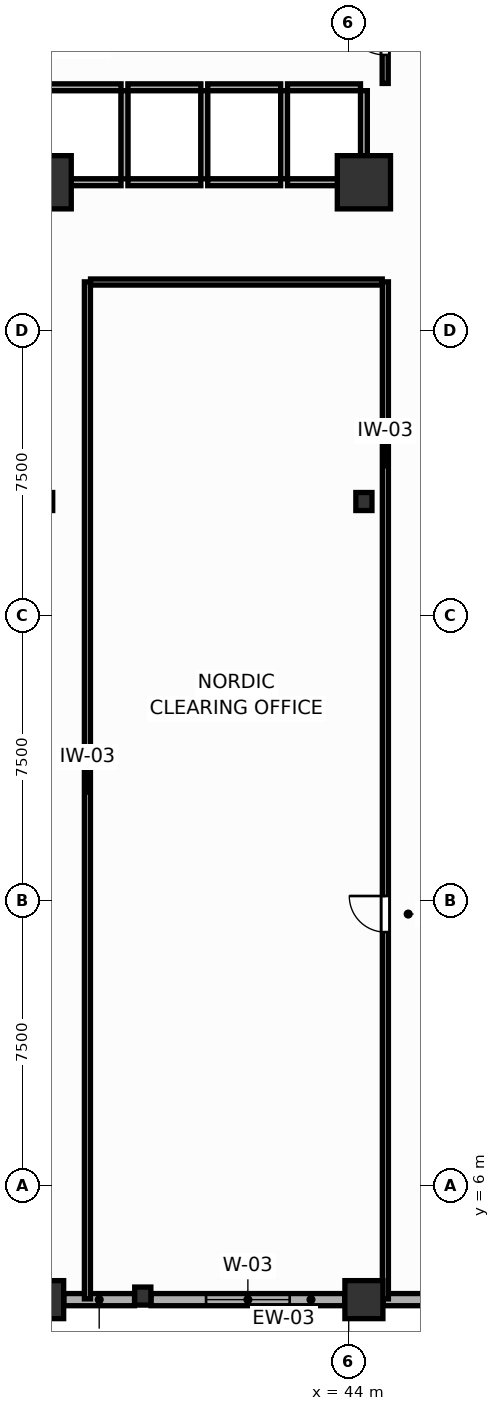
"""IFC4 building model, lengths in metres.
Left out: names, types, materials, properties, quantities, classifications, styles, units other than length and angle.
Written with IfcOpenShell. Run it as: python <this file> out.ifc"""

import sys

from ifc_helpers import new_model, si_unit, direction, frame, frame_2d, origin, origin_2d, place, context, subcontext, project, spatial, rectangle, i_section, extrude, source, transform, mapped, element, fill, save


model = new_model("IFC4")
c1 = context("Model", 3, precision=1e-05, world=origin(), true_north=direction((0.0, 1.0)))
c2 = subcontext(c1, "Body", "Model", "MODEL_VIEW")
j1 = project(units=[si_unit("LENGTHUNIT", "METRE"), si_unit("PLANEANGLEUNIT", "RADIAN")], contexts=[c1])
p1 = place(None, origin())
s1 = spatial("IfcSite", under=j1, at=p1, CompositionType="ELEMENT")
p2 = place(p1, origin())
s2 = spatial("IfcBuilding", under=s1, at=p2, CompositionType="ELEMENT")
p3 = place(p2, frame((0.0, 0.0, 14.4)))
s3 = spatial("IfcBuildingStorey", under=s2, at=p3, CompositionType="ELEMENT", Elevation=14.4)
m1 = source(origin(), c2, "Body", "SweptSolid", [
    extrude(rectangle(XDim=1.4, YDim=1.4, at=origin_2d()), origin(), (0.0, 0.0, 1.0), 4.8),
])
for number, where, z_axis, x_axis in (
    (1, (44.4, 32.4, 0.0), (0.0, 0.0, 1.0), (1.0, 0.0, 0.0)),
    (2, (36.0, 32.4, 0.0), (0.0, 0.0, 1.0), (1.0, 0.0, 0.0)),
):
    element("IfcColumn", number, at=place(p3, frame(where, z_axis=z_axis, x_axis=x_axis)), inside=s3, PredefinedType="COLUMN", context=c2, shape_type="MappedRepresentation", body=[
        mapped(m1, transform((0.0, 0.0, 0.0), scale=1.0)),
    ])
m2 = source(origin(), c2, "Body", "SweptSolid", [
    extrude(i_section(OverallWidth=0.424, OverallDepth=0.474, WebThickness=0.045, FlangeThickness=0.072, FilletRadius=0.015, at=origin_2d()), origin(), (0.0, 0.0, 1.0), 4.8),
])
for number, where, z_axis, x_axis in (
    (3, (44.4, 24.0, 0.0), (0.0, 0.0, 1.0), (1.0, 0.0, 0.0)),
    (4, (36.0, 24.0, 0.0), (0.0, 0.0, 1.0), (1.0, 0.0, 0.0)),
):
    element("IfcColumn", number, at=place(p3, frame(where, z_axis=z_axis, x_axis=x_axis)), inside=s3, PredefinedType="COLUMN", context=c2, shape_type="MappedRepresentation", body=[
        mapped(m2, transform((0.0, 0.0, 0.0), scale=1.0)),
    ])
m3 = source(origin(), c2, "Body", "SweptSolid", [
    extrude(rectangle(XDim=1.0, YDim=1.0, at=origin_2d()), origin(), (0.0, 0.0, 1.0), 4.8),
])
for number, where, z_axis, x_axis in (
    (5, (36.0, 3.0, 0.0), (0.0, 0.0, 1.0), (1.0, 0.0, 0.0)),
    (6, (44.4, 3.0, 0.0), (0.0, 0.0, 1.0), (1.0, 0.0, 0.0)),
):
    element("IfcColumn", number, at=place(p3, frame(where, z_axis=z_axis, x_axis=x_axis)), inside=s3, PredefinedType="COLUMN", context=c2, shape_type="MappedRepresentation", body=[
        mapped(m3, transform((0.0, 0.0, 0.0), scale=1.0)),
    ])
p4 = place(p3, frame((38.582, 3.094, 0.0), z_axis=(0.0, 0.0, 1.0), x_axis=(1.0, 0.0, 0.0)))
e7 = element("IfcColumn", 7, at=p4, inside=s3, PredefinedType="COLUMN", context=c2, shape_type="MappedRepresentation", body=[
    mapped(m2, transform((0.0, 0.0, 0.0), scale=1.0)),
])
p5 = place(p3, frame((36.505, 3.0, 0.0), z_axis=(0.0, 0.0, 1.0), x_axis=(1.0, 0.0, 0.0)))
e8 = element("IfcWall", 8, at=p5, inside=s3, PredefinedType="SOLIDWALL", context=c2, shape_type="SweptSolid", body=[
    extrude(rectangle(XDim=1.86, YDim=0.32, at=frame_2d((0.93, 0.0))), origin(), (0.0, 0.0, 1.0), 3.82),
])
p6 = place(p3, frame((38.799, 3.0, 0.0), z_axis=(0.0, 0.0, 1.0), x_axis=(1.0, 0.0, 0.0)))
e9 = element("IfcWall", 9, at=p6, inside=s3, PredefinedType="SOLIDWALL", context=c2, shape_type="SweptSolid", body=[
    extrude(rectangle(XDim=5.096, YDim=0.32, at=frame_2d((2.548, 0.0))), origin(), (0.0, 0.0, 1.0), 3.82),
])
p7 = place(p6, frame((1.448, 0.0, 0.75)))
e10 = element("IfcOpeningElement", 10, at=p7, cuts=e9, PredefinedType="OPENING", context=c2, shape_type="SweptSolid", body=[
    extrude(rectangle(XDim=2.2, YDim=2.0, at=frame_2d((1.1, 1.0))), frame((0.0, 0.17, 0.0), z_axis=(0.0, -1.0, 0.0), x_axis=(1.0, 0.0, 0.0)), (0.0, 0.0, 1.0), 0.34),
])
p8 = place(p3, frame((44.905, 3.0, 0.0), z_axis=(0.0, 0.0, 1.0), x_axis=(1.0, 0.0, 0.0)))
e11 = element("IfcWall", 11, at=p8, inside=s3, PredefinedType="SOLIDWALL", context=c2, shape_type="SweptSolid", body=[
    extrude(rectangle(XDim=12.59, YDim=0.32, at=frame_2d((6.295, 0.0))), origin(), (0.0, 0.0, 1.0), 3.82),
])
p9 = place(p8, frame((5.195, 0.0, 0.75)))
e12 = element("IfcOpeningElement", 12, at=p9, cuts=e11, PredefinedType="OPENING", context=c2, shape_type="SweptSolid", body=[
    extrude(rectangle(XDim=2.2, YDim=2.0, at=frame_2d((1.1, 1.0))), frame((0.0, 0.17, 0.0), z_axis=(0.0, -1.0, 0.0), x_axis=(1.0, 0.0, 0.0)), (0.0, 0.0, 1.0), 0.34),
])
p10 = place(p3, frame((36.09, 34.9, 0.0), z_axis=(0.0, 0.0, 1.0), x_axis=(1.0, 0.0, 0.0)))
e13 = element("IfcWall", 13, at=p10, inside=s3, PredefinedType="PARTITIONING", context=c2, shape_type="SweptSolid", body=[
    extrude(rectangle(XDim=1.92, YDim=0.18, at=frame_2d((0.96, 0.0))), origin(), (0.0, 0.0, 1.0), 4.52),
])
p11 = place(p3, frame((36.09, 32.4, 0.0), z_axis=(0.0, 0.0, 1.0), x_axis=(1.0, 0.0, 0.0)))
e14 = element("IfcWall", 14, at=p11, inside=s3, PredefinedType="PARTITIONING", context=c2, shape_type="SweptSolid", body=[
    extrude(rectangle(XDim=1.92, YDim=0.18, at=frame_2d((0.96, 0.0))), origin(), (0.0, 0.0, 1.0), 3.82),
])
p12 = place(p3, frame((38.19, 34.9, 0.0), z_axis=(0.0, 0.0, 1.0), x_axis=(1.0, 0.0, 0.0)))
e15 = element("IfcWall", 15, at=p12, inside=s3, PredefinedType="PARTITIONING", context=c2, shape_type="SweptSolid", body=[
    extrude(rectangle(XDim=1.92, YDim=0.18, at=frame_2d((0.96, 0.0))), origin(), (0.0, 0.0, 1.0), 4.52),
])
p13 = place(p3, frame((38.19, 32.4, 0.0), z_axis=(0.0, 0.0, 1.0), x_axis=(1.0, 0.0, 0.0)))
e16 = element("IfcWall", 16, at=p13, inside=s3, PredefinedType="PARTITIONING", context=c2, shape_type="SweptSolid", body=[
    extrude(rectangle(XDim=1.92, YDim=0.18, at=frame_2d((0.96, 0.0))), origin(), (0.0, 0.0, 1.0), 3.82),
])
p14 = place(p3, frame((38.1, 32.49, 0.0), z_axis=(0.0, 0.0, 1.0), x_axis=(0.0, 1.0, 0.0)))
e17 = element("IfcWall", 17, at=p14, inside=s3, PredefinedType="PARTITIONING", context=c2, shape_type="SweptSolid", body=[
    extrude(rectangle(XDim=2.32, YDim=0.18, at=frame_2d((1.16, 0.0))), origin(), (0.0, 0.0, 1.0), 4.52),
])
p15 = place(p3, frame((40.29, 34.9, 0.0), z_axis=(0.0, 0.0, 1.0), x_axis=(1.0, 0.0, 0.0)))
e18 = element("IfcWall", 18, at=p15, inside=s3, PredefinedType="PARTITIONING", context=c2, shape_type="SweptSolid", body=[
    extrude(rectangle(XDim=1.92, YDim=0.18, at=frame_2d((0.96, 0.0))), origin(), (0.0, 0.0, 1.0), 4.52),
])
p16 = place(p3, frame((40.29, 32.4, 0.0), z_axis=(0.0, 0.0, 1.0), x_axis=(1.0, 0.0, 0.0)))
e19 = element("IfcWall", 19, at=p16, inside=s3, PredefinedType="PARTITIONING", context=c2, shape_type="SweptSolid", body=[
    extrude(rectangle(XDim=1.92, YDim=0.18, at=frame_2d((0.96, 0.0))), origin(), (0.0, 0.0, 1.0), 3.82),
])
p17 = place(p3, frame((40.2, 32.49, 0.0), z_axis=(0.0, 0.0, 1.0), x_axis=(0.0, 1.0, 0.0)))
e20 = element("IfcWall", 20, at=p17, inside=s3, PredefinedType="PARTITIONING", context=c2, shape_type="SweptSolid", body=[
    extrude(rectangle(XDim=2.32, YDim=0.18, at=frame_2d((1.16, 0.0))), origin(), (0.0, 0.0, 1.0), 4.52),
])
p18 = place(p3, frame((42.39, 34.9, 0.0), z_axis=(0.0, 0.0, 1.0), x_axis=(1.0, 0.0, 0.0)))
e21 = element("IfcWall", 21, at=p18, inside=s3, PredefinedType="PARTITIONING", context=c2, shape_type="SweptSolid", body=[
    extrude(rectangle(XDim=1.92, YDim=0.18, at=frame_2d((0.96, 0.0))), origin(), (0.0, 0.0, 1.0), 4.52),
])
p19 = place(p3, frame((42.39, 32.4, 0.0), z_axis=(0.0, 0.0, 1.0), x_axis=(1.0, 0.0, 0.0)))
e22 = element("IfcWall", 22, at=p19, inside=s3, PredefinedType="PARTITIONING", context=c2, shape_type="SweptSolid", body=[
    extrude(rectangle(XDim=1.92, YDim=0.18, at=frame_2d((0.96, 0.0))), origin(), (0.0, 0.0, 1.0), 3.82),
])
for number, where, z_axis, x_axis in (
    (23, (42.3, 32.49, 0.0), (0.0, 0.0, 1.0), (0.0, 1.0, 0.0)),
    (24, (44.4, 32.49, 0.0), (0.0, 0.0, 1.0), (0.0, 1.0, 0.0)),
):
    element("IfcWall", number, at=place(p3, frame(where, z_axis=z_axis, x_axis=x_axis)), inside=s3, PredefinedType="PARTITIONING", context=c2, shape_type="SweptSolid", body=[
        extrude(rectangle(XDim=2.32, YDim=0.18, at=frame_2d((1.16, 0.0))), origin(), (0.0, 0.0, 1.0), 4.52),
    ])
p20 = place(p3, frame((44.96, 35.0, 0.0), z_axis=(0.0, 0.0, 1.0), x_axis=(0.0, 1.0, 0.0)))
e25 = element("IfcWall", 25, at=p20, inside=s3, PredefinedType="PARTITIONING", context=c2, shape_type="SweptSolid", body=[
    extrude(rectangle(XDim=2.65, YDim=0.16, at=frame_2d((1.325, 0.0))), origin(), (0.0, 0.0, 1.0), 4.52),
])
p21 = place(p20, frame((0.75, 0.0, 0.0)))
e26 = element("IfcOpeningElement", 26, at=p21, cuts=e25, PredefinedType="OPENING", context=c2, shape_type="SweptSolid", body=[
    extrude(rectangle(XDim=1.05, YDim=2.1, at=frame_2d((0.525, 1.05))), frame((0.0, 0.09, 0.0), z_axis=(0.0, -1.0, 0.0), x_axis=(1.0, 0.0, 0.0)), (0.0, 0.0, 1.0), 0.18),
])
p22 = place(p3, frame((44.965, 3.02, 0.0), z_axis=(0.0, 0.0, 1.0), x_axis=(0.0, 1.0, 0.0)))
e27 = element("IfcWall", 27, at=p22, inside=s3, PredefinedType="PARTITIONING", context=c2, shape_type="SweptSolid", body=[
    extrude(rectangle(XDim=26.76, YDim=0.16, at=frame_2d((13.38, 0.0))), origin(), (0.0, 0.0, 1.0), 4.52),
])
p23 = place(p22, frame((9.65, 0.0, 0.0)))
e28 = element("IfcOpeningElement", 28, at=p23, cuts=e27, PredefinedType="OPENING", context=c2, shape_type="SweptSolid", body=[
    extrude(rectangle(XDim=0.95, YDim=2.05, at=frame_2d((0.475, 1.025))), frame((0.0, 0.09, 0.0), z_axis=(0.0, -1.0, 0.0), x_axis=(1.0, 0.0, 0.0)), (0.0, 0.0, 1.0), 0.18),
])
p24 = place(p3, frame((37.125, 3.02, 0.0), z_axis=(0.0, 0.0, 1.0), x_axis=(0.0, 1.0, 0.0)))
e29 = element("IfcWall", 29, at=p24, inside=s3, PredefinedType="PARTITIONING", context=c2, shape_type="SweptSolid", body=[
    extrude(rectangle(XDim=26.76, YDim=0.16, at=frame_2d((13.38, 0.0))), origin(), (0.0, 0.0, 1.0), 4.52),
])
p25 = place(p3, frame((37.207, 29.775, 0.0), z_axis=(0.0, 0.0, 1.0), x_axis=(1.0, 0.0, 0.0)))
e30 = element("IfcWall", 30, at=p25, inside=s3, PredefinedType="PARTITIONING", context=c2, shape_type="SweptSolid", body=[
    extrude(rectangle(XDim=7.676, YDim=0.16, at=frame_2d((3.838, 0.0))), origin(), (0.0, 0.0, 1.0), 4.52),
])
p26 = place(p7, origin())
e31 = element("IfcWindow", 31, at=p26, inside=s3, PartitioningType="SINGLE_PANEL", PredefinedType="WINDOW", context=c2, shape_type="SweptSolid", body=[
    extrude(rectangle(XDim=2.2, YDim=2.0, at=frame_2d((1.1, 1.0))), frame((0.0, 0.03, 0.0), z_axis=(0.0, -1.0, 0.0), x_axis=(1.0, 0.0, 0.0)), (0.0, 0.0, 1.0), 0.06),
])
fill(e10, e31)
p27 = place(p21, origin())
e32 = element("IfcDoor", 32, at=p27, inside=s3, OperationType="SINGLE_SWING_RIGHT", PredefinedType="DOOR", context=c2, shape_type="SweptSolid", body=[
    extrude(rectangle(XDim=1.05, YDim=2.1, at=frame_2d((0.525, 1.05))), frame((0.0, 0.025, 0.0), z_axis=(0.0, -1.0, 0.0), x_axis=(1.0, 0.0, 0.0)), (0.0, 0.0, 1.0), 0.05),
])
fill(e26, e32)
p28 = place(p23, origin())
e33 = element("IfcDoor", 33, at=p28, inside=s3, OperationType="SINGLE_SWING_RIGHT", PredefinedType="DOOR", context=c2, shape_type="SweptSolid", body=[
    extrude(rectangle(XDim=0.95, YDim=2.05, at=frame_2d((0.475, 1.025))), frame((0.0, 0.025, 0.0), z_axis=(0.0, -1.0, 0.0), x_axis=(1.0, 0.0, 0.0)), (0.0, 0.0, 1.0), 0.05),
])
fill(e28, e33)
save(model, sys.argv[1])
